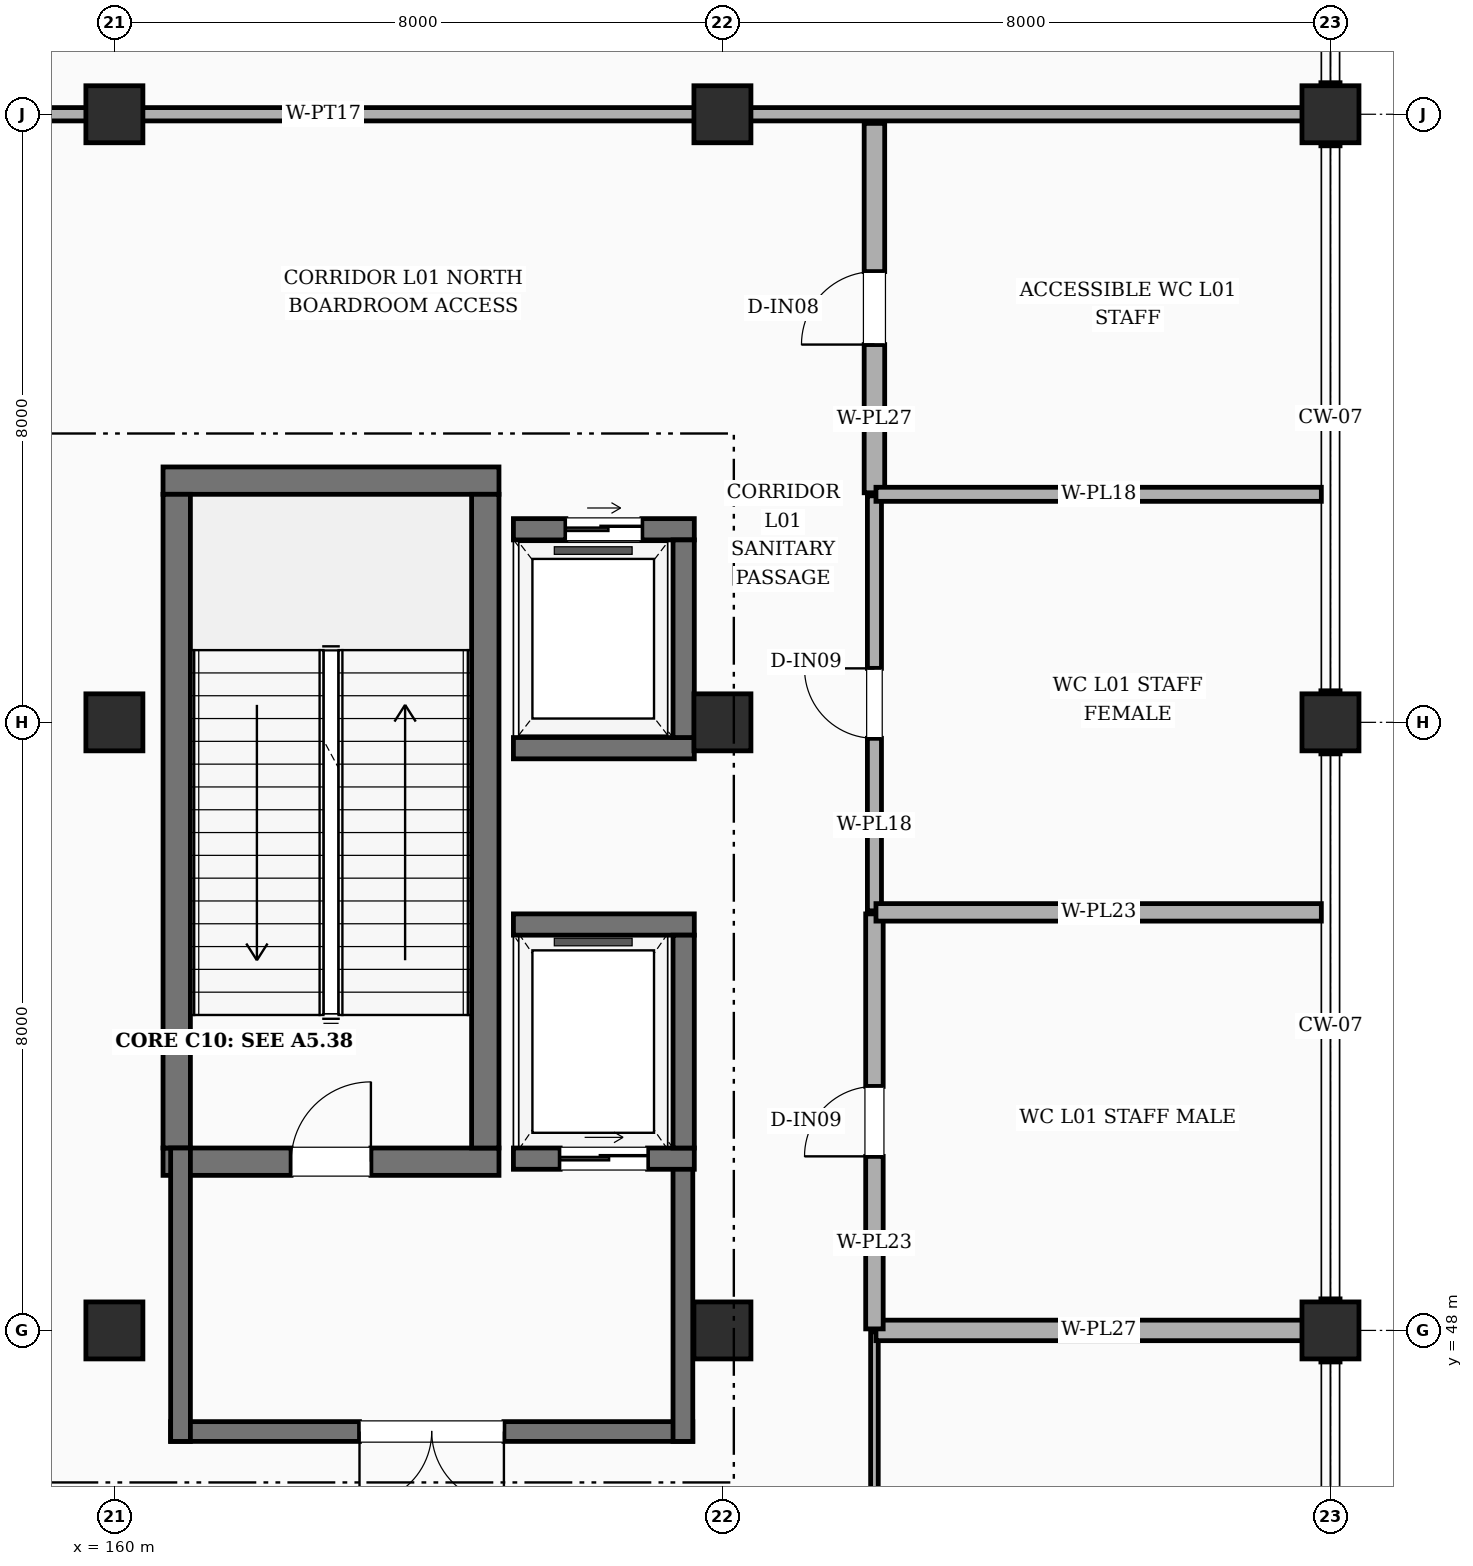
"""IFC4 building model, lengths in metres.
Left out: names, types, materials, properties, quantities, classifications, styles, units other than length and angle.
Written with IfcOpenShell. Run it as: python <this file> out.ifc"""

import sys

from ifc_helpers import new_model, si_unit, direction, frame, frame_2d, origin, origin_2d, place, context, subcontext, project, spatial, rectangle, extrude, element, fill, save


model = new_model("IFC4")
c1 = context("Model", 3, precision=1e-05, world=origin(), true_north=direction((0.0, 1.0)))
c2 = subcontext(c1, "Body", "Model", "MODEL_VIEW")
j1 = project(units=[si_unit("LENGTHUNIT", "METRE"), si_unit("PLANEANGLEUNIT", "RADIAN")], contexts=[c1])
p1 = place(None, origin())
s1 = spatial("IfcSite", under=j1, at=p1, CompositionType="ELEMENT")
p2 = place(p1, origin())
s2 = spatial("IfcBuilding", under=s1, at=p2, CompositionType="ELEMENT")
p3 = place(p2, frame((0.0, 0.0, 5.4)))
s3 = spatial("IfcBuildingStorey", under=s2, at=p3, CompositionType="ELEMENT", Elevation=5.4)
for number, where, z_axis, x_axis in (
    (1, (160.0, 48.0, 0.0), (0.0, 0.0, 1.0), (1.0, 0.0, 0.0)),
    (2, (160.0, 56.0, 0.0), (0.0, 0.0, 1.0), (1.0, 0.0, 0.0)),
    (3, (160.0, 64.0, 0.0), (0.0, 0.0, 1.0), (1.0, 0.0, 0.0)),
    (4, (168.0, 48.0, 0.0), (0.0, 0.0, 1.0), (1.0, 0.0, 0.0)),
    (5, (168.0, 56.0, 0.0), (0.0, 0.0, 1.0), (1.0, 0.0, 0.0)),
    (6, (168.0, 64.0, 0.0), (0.0, 0.0, 1.0), (1.0, 0.0, 0.0)),
    (7, (176.0, 48.0, 0.0), (0.0, 0.0, 1.0), (1.0, 0.0, 0.0)),
    (8, (176.0, 56.0, 0.0), (0.0, 0.0, 1.0), (1.0, 0.0, 0.0)),
    (9, (176.0, 64.0, 0.0), (0.0, 0.0, 1.0), (1.0, 0.0, 0.0)),
):
    element("IfcColumn", number, at=place(p3, frame(where, z_axis=z_axis, x_axis=x_axis)), inside=s3, PredefinedType="COLUMN", context=c2, shape_type="SweptSolid", body=[
        extrude(rectangle(XDim=0.75, YDim=0.75, at=origin_2d()), origin(), (0.0, 0.0, 1.0), 5.4),
    ])
p4 = place(p3, frame((160.64, 50.22, 0.0), z_axis=(0.0, 0.0, 1.0), x_axis=(1.0, 0.0, 0.0)))
e10 = element("IfcWall", 10, at=p4, inside=s3, PredefinedType="SHEAR", context=c2, shape_type="SweptSolid", body=[
    extrude(rectangle(XDim=4.42, YDim=0.36, at=frame_2d((2.21, 0.0))), origin(), (0.0, 0.0, 1.0), 5.4),
])
p5 = place(p4, frame((1.685, 0.0, 0.0)))
e11 = element("IfcOpeningElement", 11, at=p5, cuts=e10, PredefinedType="OPENING", context=c2, shape_type="SweptSolid", body=[
    extrude(rectangle(XDim=1.05, YDim=2.15, at=frame_2d((0.525, 1.075))), frame((0.0, 0.19, 0.0), z_axis=(0.0, -1.0, 0.0), x_axis=(1.0, 0.0, 0.0)), (0.0, 0.0, 1.0), 0.38),
])
p6 = place(p3, frame((160.64, 59.18, 0.0), z_axis=(0.0, 0.0, 1.0), x_axis=(1.0, 0.0, 0.0)))
e12 = element("IfcWall", 12, at=p6, inside=s3, PredefinedType="SHEAR", context=c2, shape_type="SweptSolid", body=[
    extrude(rectangle(XDim=4.42, YDim=0.36, at=frame_2d((2.21, 0.0))), origin(), (0.0, 0.0, 1.0), 5.4),
])
for number, where, z_axis, x_axis in (
    (13, (160.82, 50.4, 0.0), (0.0, 0.0, 1.0), (0.0, 1.0, 0.0)),
    (14, (164.88, 50.4, 0.0), (0.0, 0.0, 1.0), (0.0, 1.0, 0.0)),
):
    element("IfcWall", number, at=place(p3, frame(where, z_axis=z_axis, x_axis=x_axis)), inside=s3, PredefinedType="SHEAR", context=c2, shape_type="SweptSolid", body=[
        extrude(rectangle(XDim=8.6, YDim=0.36, at=frame_2d((4.3, 0.0))), origin(), (0.0, 0.0, 1.0), 5.4),
    ])
p7 = place(p3, frame((167.61, 46.67, 0.0), z_axis=(0.0, 0.0, 1.0), x_axis=(-1.0, 0.0, 0.0)))
e15 = element("IfcWall", 15, at=p7, inside=s3, PredefinedType="SHEAR", context=c2, shape_type="SweptSolid", body=[
    extrude(rectangle(XDim=6.87, YDim=0.26, at=frame_2d((3.435, 0.0))), origin(), (0.0, 0.0, 1.0), 5.4),
])
p8 = place(p7, frame((2.485, 0.0, 0.0)))
e16 = element("IfcOpeningElement", 16, at=p8, cuts=e15, PredefinedType="OPENING", context=c2, shape_type="SweptSolid", body=[
    extrude(rectangle(XDim=1.9, YDim=2.25, at=frame_2d((0.95, 1.125))), frame((0.0, 0.14, 0.0), z_axis=(0.0, -1.0, 0.0), x_axis=(1.0, 0.0, 0.0)), (0.0, 0.0, 1.0), 0.28),
])
for number, where, z_axis, x_axis in (
    (17, (160.87, 46.54, 0.0), (0.0, 0.0, 1.0), (0.0, 1.0, 0.0)),
    (18, (167.48, 46.54, 0.0), (0.0, 0.0, 1.0), (0.0, 1.0, 0.0)),
):
    element("IfcWall", number, at=place(p3, frame(where, z_axis=z_axis, x_axis=x_axis)), inside=s3, PredefinedType="SHEAR", context=c2, shape_type="SweptSolid", body=[
        extrude(rectangle(XDim=3.86, YDim=0.26, at=frame_2d((1.93, 0.0))), origin(), (0.0, 0.0, 1.0), 5.4),
    ])
p9 = place(p3, frame((165.25, 50.26, 0.0), z_axis=(0.0, 0.0, 1.0), x_axis=(1.0, 0.0, 0.0)))
e19 = element("IfcWall", 19, at=p9, inside=s3, PredefinedType="SHEAR", context=c2, shape_type="SweptSolid", body=[
    extrude(rectangle(XDim=2.38, YDim=0.28, at=frame_2d((1.19, 0.0))), origin(), (0.0, 0.0, 1.0), 5.4),
])
p10 = place(p9, frame((0.615, 0.0, 0.0)))
e20 = element("IfcOpeningElement", 20, at=p10, cuts=e19, PredefinedType="OPENING", context=c2, shape_type="SweptSolid", body=[
    extrude(rectangle(XDim=1.15, YDim=2.2, at=frame_2d((0.575, 1.1))), frame((0.0, 0.15, 0.0), z_axis=(0.0, -1.0, 0.0), x_axis=(1.0, 0.0, 0.0)), (0.0, 0.0, 1.0), 0.3),
])
p11 = place(p3, frame((165.25, 53.34, 0.0), z_axis=(0.0, 0.0, 1.0), x_axis=(1.0, 0.0, 0.0)))
e21 = element("IfcWall", 21, at=p11, inside=s3, PredefinedType="SHEAR", context=c2, shape_type="SweptSolid", body=[
    extrude(rectangle(XDim=2.38, YDim=0.28, at=frame_2d((1.19, 0.0))), origin(), (0.0, 0.0, 1.0), 5.4),
])
p12 = place(p3, frame((167.49, 50.4, 0.0), z_axis=(0.0, 0.0, 1.0), x_axis=(0.0, 1.0, 0.0)))
e22 = element("IfcWall", 22, at=p12, inside=s3, PredefinedType="SHEAR", context=c2, shape_type="SweptSolid", body=[
    extrude(rectangle(XDim=2.8, YDim=0.28, at=frame_2d((1.4, 0.0))), origin(), (0.0, 0.0, 1.0), 5.4),
])
p13 = place(p3, frame((165.25, 55.66, 0.0), z_axis=(0.0, 0.0, 1.0), x_axis=(1.0, 0.0, 0.0)))
e23 = element("IfcWall", 23, at=p13, inside=s3, PredefinedType="SHEAR", context=c2, shape_type="SweptSolid", body=[
    extrude(rectangle(XDim=2.38, YDim=0.28, at=frame_2d((1.19, 0.0))), origin(), (0.0, 0.0, 1.0), 5.4),
])
p14 = place(p3, frame((165.25, 58.54, 0.0), z_axis=(0.0, 0.0, 1.0), x_axis=(1.0, 0.0, 0.0)))
e24 = element("IfcWall", 24, at=p14, inside=s3, PredefinedType="SHEAR", context=c2, shape_type="SweptSolid", body=[
    extrude(rectangle(XDim=2.38, YDim=0.28, at=frame_2d((1.19, 0.0))), origin(), (0.0, 0.0, 1.0), 5.4),
])
p15 = place(p14, frame((0.69, 0.0, 0.0)))
e25 = element("IfcOpeningElement", 25, at=p15, cuts=e24, PredefinedType="OPENING", context=c2, shape_type="SweptSolid", body=[
    extrude(rectangle(XDim=1.0, YDim=2.15, at=frame_2d((0.5, 1.075))), frame((0.0, 0.15, 0.0), z_axis=(0.0, -1.0, 0.0), x_axis=(1.0, 0.0, 0.0)), (0.0, 0.0, 1.0), 0.3),
])
p16 = place(p3, frame((167.49, 55.8, 0.0), z_axis=(0.0, 0.0, 1.0), x_axis=(0.0, 1.0, 0.0)))
e26 = element("IfcWall", 26, at=p16, inside=s3, PredefinedType="SHEAR", context=c2, shape_type="SweptSolid", body=[
    extrude(rectangle(XDim=2.6, YDim=0.28, at=frame_2d((1.3, 0.0))), origin(), (0.0, 0.0, 1.0), 5.4),
])
p17 = place(p3, frame((170.0, 24.02, 0.0), z_axis=(0.0, 0.0, 1.0), x_axis=(0.0, 1.0, 0.0)))
e27 = element("IfcWall", 27, at=p17, inside=s3, PredefinedType="PARTITIONING", context=c2, shape_type="SweptSolid", body=[
    extrude(rectangle(XDim=23.96, YDim=0.1, at=frame_2d((11.98, 0.0))), origin(), (0.0, 0.0, 1.0), 4.39),
])
p18 = place(p17, frame((11.44, 0.0, 0.0)))
e28 = element("IfcOpeningElement", 28, at=p18, cuts=e27, PredefinedType="OPENING", context=c2, shape_type="SweptSolid", body=[
    extrude(rectangle(XDim=1.08, YDim=2.15, at=frame_2d((0.54, 1.075))), frame((0.0, 0.06, 0.0), z_axis=(0.0, -1.0, 0.0), x_axis=(1.0, 0.0, 0.0)), (0.0, 0.0, 1.0), 0.12),
])
p19 = place(p3, frame((170.02, 48.0, 0.0), z_axis=(0.0, 0.0, 1.0), x_axis=(1.0, 0.0, 0.0)))
e29 = element("IfcWall", 29, at=p19, inside=s3, PredefinedType="PLUMBINGWALL", context=c2, shape_type="SweptSolid", body=[
    extrude(rectangle(XDim=5.86, YDim=0.27, at=frame_2d((2.93, 0.0))), origin(), (0.0, 0.0, 1.0), 4.39),
])
p20 = place(p3, frame((170.0, 48.02, 0.0), z_axis=(0.0, 0.0, 1.0), x_axis=(0.0, 1.0, 0.0)))
e30 = element("IfcWall", 30, at=p20, inside=s3, PredefinedType="PLUMBINGWALL", context=c2, shape_type="SweptSolid", body=[
    extrude(rectangle(XDim=5.46, YDim=0.23, at=frame_2d((2.73, 0.0))), origin(), (0.0, 0.0, 1.0), 4.39),
])
p21 = place(p20, frame((2.27, 0.0, 0.0)))
e31 = element("IfcOpeningElement", 31, at=p21, cuts=e30, PredefinedType="OPENING", context=c2, shape_type="SweptSolid", body=[
    extrude(rectangle(XDim=0.92, YDim=2.1, at=frame_2d((0.46, 1.05))), frame((0.0, 0.125, 0.0), z_axis=(0.0, -1.0, 0.0), x_axis=(1.0, 0.0, 0.0)), (0.0, 0.0, 1.0), 0.25),
])
p22 = place(p3, frame((170.0, 53.52, 0.0), z_axis=(0.0, 0.0, 1.0), x_axis=(0.0, 1.0, 0.0)))
e32 = element("IfcWall", 32, at=p22, inside=s3, PredefinedType="PLUMBINGWALL", context=c2, shape_type="SweptSolid", body=[
    extrude(rectangle(XDim=5.46, YDim=0.185, at=frame_2d((2.73, 0.0))), origin(), (0.0, 0.0, 1.0), 4.39),
])
p23 = place(p22, frame((2.27, 0.0, 0.0)))
e33 = element("IfcOpeningElement", 33, at=p23, cuts=e32, PredefinedType="OPENING", context=c2, shape_type="SweptSolid", body=[
    extrude(rectangle(XDim=0.92, YDim=2.1, at=frame_2d((0.46, 1.05))), frame((0.0, 0.103, 0.0), z_axis=(0.0, -1.0, 0.0), x_axis=(1.0, 0.0, 0.0)), (0.0, 0.0, 1.0), 0.205),
])
p24 = place(p3, frame((170.0, 59.02, 0.0), z_axis=(0.0, 0.0, 1.0), x_axis=(0.0, 1.0, 0.0)))
e34 = element("IfcWall", 34, at=p24, inside=s3, PredefinedType="PLUMBINGWALL", context=c2, shape_type="SweptSolid", body=[
    extrude(rectangle(XDim=4.86, YDim=0.27, at=frame_2d((2.43, 0.0))), origin(), (0.0, 0.0, 1.0), 4.39),
])
p25 = place(p24, frame((1.95, 0.0, 0.0)))
e35 = element("IfcOpeningElement", 35, at=p25, cuts=e34, PredefinedType="OPENING", context=c2, shape_type="SweptSolid", body=[
    extrude(rectangle(XDim=0.96, YDim=2.1, at=frame_2d((0.48, 1.05))), frame((0.0, 0.145, 0.0), z_axis=(0.0, -1.0, 0.0), x_axis=(1.0, 0.0, 0.0)), (0.0, 0.0, 1.0), 0.29),
])
p26 = place(p3, frame((170.02, 53.5, 0.0), z_axis=(0.0, 0.0, 1.0), x_axis=(1.0, 0.0, 0.0)))
e36 = element("IfcWall", 36, at=p26, inside=s3, PredefinedType="PLUMBINGWALL", context=c2, shape_type="SweptSolid", body=[
    extrude(rectangle(XDim=5.86, YDim=0.23, at=frame_2d((2.93, 0.0))), origin(), (0.0, 0.0, 1.0), 4.44),
])
p27 = place(p3, frame((170.02, 59.0, 0.0), z_axis=(0.0, 0.0, 1.0), x_axis=(1.0, 0.0, 0.0)))
e37 = element("IfcWall", 37, at=p27, inside=s3, PredefinedType="PLUMBINGWALL", context=c2, shape_type="SweptSolid", body=[
    extrude(rectangle(XDim=5.86, YDim=0.185, at=frame_2d((2.93, 0.0))), origin(), (0.0, 0.0, 1.0), 4.44),
])
p28 = place(p3, frame((149.62, 64.0, 0.0), z_axis=(0.0, 0.0, 1.0), x_axis=(1.0, 0.0, 0.0)))
e38 = element("IfcWall", 38, at=p28, inside=s3, PredefinedType="PARTITIONING", context=c2, shape_type="SweptSolid", body=[
    extrude(rectangle(XDim=26.26, YDim=0.175, at=frame_2d((13.13, 0.0))), origin(), (0.0, 0.0, 1.0), 4.39),
])
p29 = place(p5, origin())
e39 = element("IfcDoor", 39, at=p29, inside=s3, OperationType="SINGLE_SWING_RIGHT", PredefinedType="DOOR", context=c2, shape_type="SweptSolid", body=[
    extrude(rectangle(XDim=1.05, YDim=2.15, at=frame_2d((0.525, 1.075))), frame((0.0, 0.025, 0.0), z_axis=(0.0, -1.0, 0.0), x_axis=(1.0, 0.0, 0.0)), (0.0, 0.0, 1.0), 0.05),
])
fill(e11, e39)
p30 = place(p8, origin())
e40 = element("IfcDoor", 40, at=p30, inside=s3, OperationType="DOUBLE_DOOR_SINGLE_SWING", PredefinedType="DOOR", context=c2, shape_type="SweptSolid", body=[
    extrude(rectangle(XDim=1.9, YDim=2.25, at=frame_2d((0.95, 1.125))), frame((0.0, 0.025, 0.0), z_axis=(0.0, -1.0, 0.0), x_axis=(1.0, 0.0, 0.0)), (0.0, 0.0, 1.0), 0.05),
])
fill(e16, e40)
p31 = place(p10, origin())
e41 = element("IfcDoor", 41, at=p31, inside=s3, OperationType="SLIDING_TO_LEFT", PredefinedType="DOOR", context=c2, shape_type="SweptSolid", body=[
    extrude(rectangle(XDim=1.15, YDim=2.2, at=frame_2d((0.575, 1.1))), frame((0.0, 0.025, 0.0), z_axis=(0.0, -1.0, 0.0), x_axis=(1.0, 0.0, 0.0)), (0.0, 0.0, 1.0), 0.05),
])
fill(e20, e41)
p32 = place(p15, origin())
e42 = element("IfcDoor", 42, at=p32, inside=s3, OperationType="SLIDING_TO_LEFT", PredefinedType="DOOR", context=c2, shape_type="SweptSolid", body=[
    extrude(rectangle(XDim=1.0, YDim=2.15, at=frame_2d((0.5, 1.075))), frame((0.0, 0.025, 0.0), z_axis=(0.0, -1.0, 0.0), x_axis=(1.0, 0.0, 0.0)), (0.0, 0.0, 1.0), 0.05),
])
fill(e25, e42)
p33 = place(p21, origin())
e43 = element("IfcDoor", 43, at=p33, inside=s3, OperationType="SINGLE_SWING_LEFT", PredefinedType="DOOR", context=c2, shape_type="SweptSolid", body=[
    extrude(rectangle(XDim=0.92, YDim=2.1, at=frame_2d((0.46, 1.05))), frame((0.0, 0.025, 0.0), z_axis=(0.0, -1.0, 0.0), x_axis=(1.0, 0.0, 0.0)), (0.0, 0.0, 1.0), 0.05),
])
fill(e31, e43)
p34 = place(p23, origin())
e44 = element("IfcDoor", 44, at=p34, inside=s3, OperationType="SINGLE_SWING_RIGHT", PredefinedType="DOOR", context=c2, shape_type="SweptSolid", body=[
    extrude(rectangle(XDim=0.92, YDim=2.1, at=frame_2d((0.46, 1.05))), frame((0.0, 0.025, 0.0), z_axis=(0.0, -1.0, 0.0), x_axis=(1.0, 0.0, 0.0)), (0.0, 0.0, 1.0), 0.05),
])
fill(e33, e44)
p35 = place(p25, origin())
e45 = element("IfcDoor", 45, at=p35, inside=s3, OperationType="SINGLE_SWING_LEFT", PredefinedType="DOOR", context=c2, shape_type="SweptSolid", body=[
    extrude(rectangle(XDim=0.96, YDim=2.1, at=frame_2d((0.48, 1.05))), frame((0.0, 0.025, 0.0), z_axis=(0.0, -1.0, 0.0), x_axis=(1.0, 0.0, 0.0)), (0.0, 0.0, 1.0), 0.05),
])
fill(e35, e45)
save(model, sys.argv[1])
